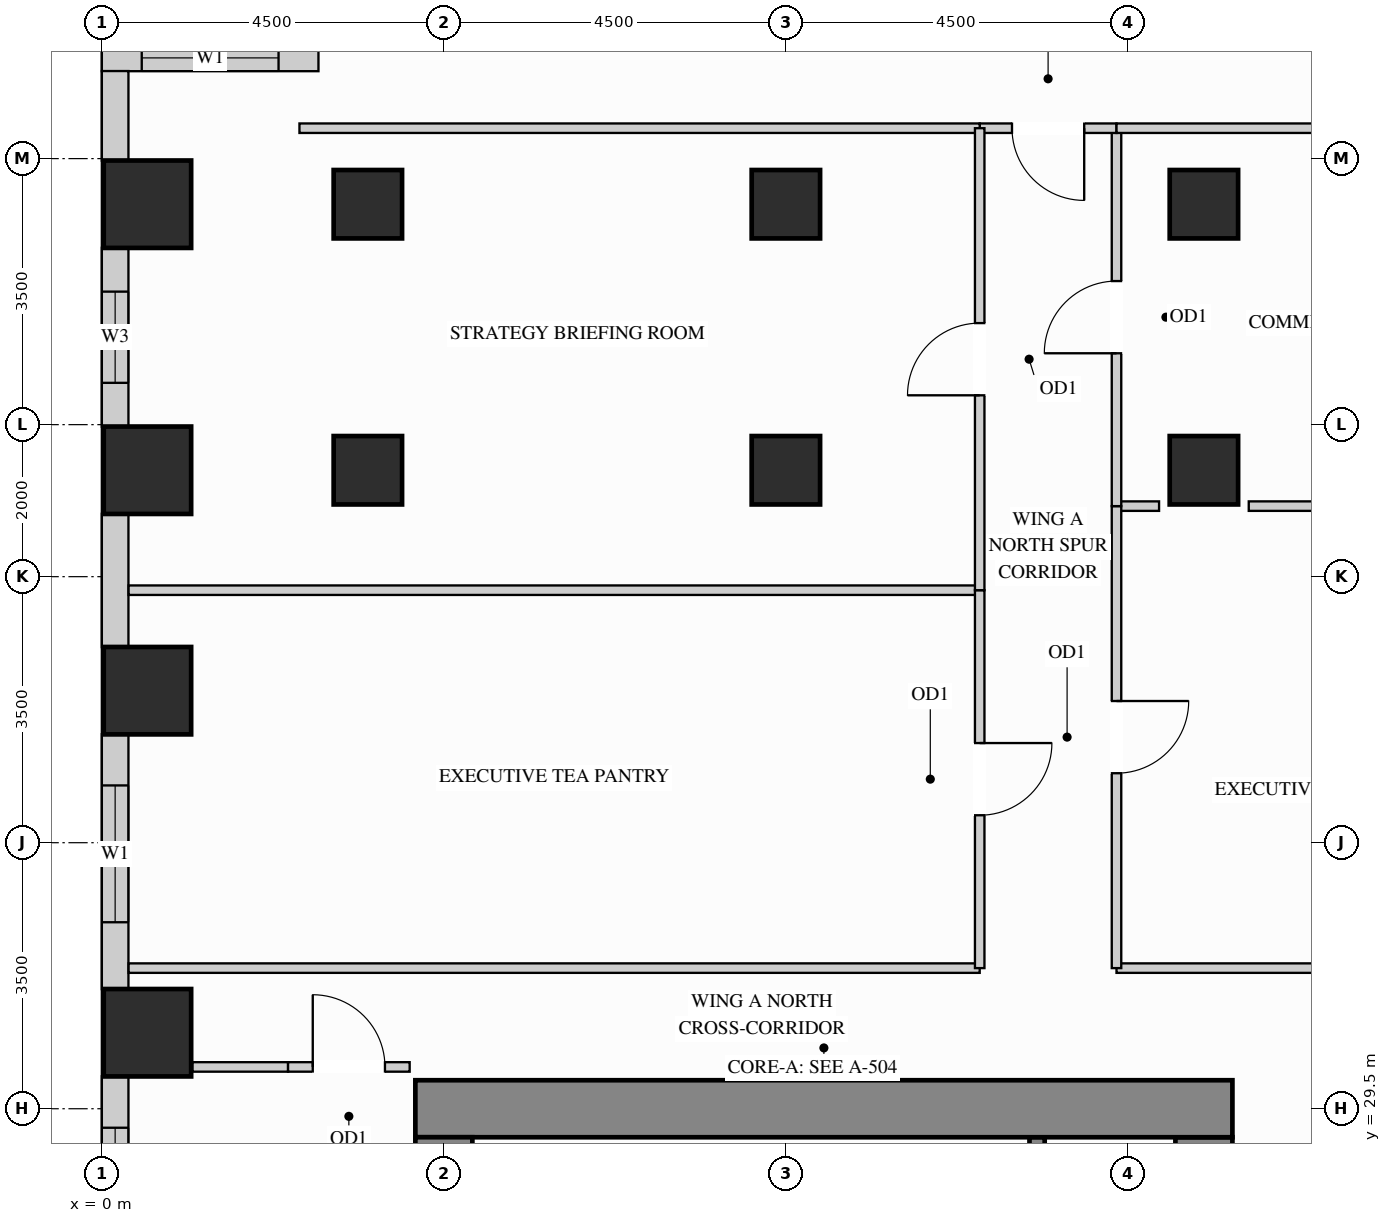
"""IFC4 building model, lengths in metres.
Left out: names, types, materials, properties, quantities, classifications, styles, units other than length and angle.
Written with IfcOpenShell. Run it as: python <this file> out.ifc"""

import sys

from ifc_helpers import new_model, si_unit, direction, frame, frame_2d, origin, origin_2d, place, context, subcontext, project, spatial, rectangle, extrude, source, transform, mapped, element, fill, save


model = new_model("IFC4")
c1 = context("Model", 3, precision=1e-05, world=origin(), true_north=direction((0.0, 1.0)))
c2 = subcontext(c1, "Body", "Model", "MODEL_VIEW")
j1 = project(units=[si_unit("LENGTHUNIT", "METRE"), si_unit("PLANEANGLEUNIT", "RADIAN")], contexts=[c1])
p1 = place(None, origin())
s1 = spatial("IfcSite", under=j1, at=p1, CompositionType="ELEMENT")
p2 = place(p1, origin())
s2 = spatial("IfcBuilding", under=s1, at=p2, CompositionType="ELEMENT")
p3 = place(p2, frame((0.0, 0.0, 88.2)))
s3 = spatial("IfcBuildingStorey", under=s2, at=p3, CompositionType="ELEMENT", Elevation=88.2)
m1 = source(origin(), c2, "Body", "SweptSolid", [
    extrude(rectangle(XDim=0.9, YDim=0.9, at=origin_2d()), origin(), (0.0, 0.0, 1.0), 3.38),
])
for number, where, z_axis, x_axis in (
    (1, (14.5, 37.9, 0.0), (0.0, 0.0, 1.0), (1.0, 0.0, 0.0)),
    (2, (14.5, 41.4, 0.0), (0.0, 0.0, 1.0), (1.0, 0.0, 0.0)),
    (3, (3.5, 37.9, 0.0), (0.0, 0.0, 1.0), (1.0, 0.0, 0.0)),
    (4, (3.5, 41.4, 0.0), (0.0, 0.0, 1.0), (1.0, 0.0, 0.0)),
    (5, (9.0, 37.9, 0.0), (0.0, 0.0, 1.0), (1.0, 0.0, 0.0)),
    (6, (9.0, 41.4, 0.0), (0.0, 0.0, 1.0), (1.0, 0.0, 0.0)),
):
    element("IfcColumn", number, at=place(p3, frame(where, z_axis=z_axis, x_axis=x_axis)), inside=s3, PredefinedType="COLUMN", context=c2, shape_type="MappedRepresentation", body=[
        mapped(m1, transform((0.0, 0.0, 0.0), x_axis=(1.0, 0.0, 0.0), y_axis=(0.0, 1.0, 0.0), z_axis=(0.0, 0.0, 1.0))),
    ])
m2 = source(origin(), c2, "Body", "SweptSolid", [
    extrude(rectangle(XDim=1.15, YDim=1.15, at=origin_2d()), origin(), (0.0, 0.0, 1.0), 3.38),
])
for number, where, z_axis, x_axis in (
    (7, (0.6, 30.5, 0.0), (0.0, 0.0, 1.0), (1.0, 0.0, 0.0)),
    (8, (0.6, 35.0, 0.0), (0.0, 0.0, 1.0), (1.0, 0.0, 0.0)),
    (9, (0.6, 37.9, 0.0), (0.0, 0.0, 1.0), (1.0, 0.0, 0.0)),
    (10, (0.6, 41.4, 0.0), (0.0, 0.0, 1.0), (1.0, 0.0, 0.0)),
):
    element("IfcColumn", number, at=place(p3, frame(where, z_axis=z_axis, x_axis=x_axis)), inside=s3, PredefinedType="COLUMN", context=c2, shape_type="MappedRepresentation", body=[
        mapped(m2, transform((0.0, 0.0, 0.0), x_axis=(1.0, 0.0, 0.0), y_axis=(0.0, 1.0, 0.0), z_axis=(0.0, 0.0, 1.0))),
    ])
m3 = source(origin(), c2, "Body", "SweptSolid", [
    extrude(rectangle(XDim=8.245, YDim=0.75, at=frame_2d((4.123, 0.0))), origin(), (0.0, 0.0, 1.0), 3.38),
])
p4 = place(p3, frame((14.5, 20.88, 0.0), z_axis=(0.0, 0.0, 1.0), x_axis=(0.0, 1.0, 0.0)))
e11 = element("IfcWall", 11, at=p4, inside=s3, PredefinedType="SHEAR", context=c2, shape_type="MappedRepresentation", body=[
    mapped(m3, transform((0.0, 0.0, 0.0), x_axis=(1.0, 0.0, 0.0), y_axis=(0.0, 1.0, 0.0), z_axis=(0.0, 0.0, 1.0))),
])
m4 = source(origin(), c2, "Body", "SweptSolid", [
    extrude(rectangle(XDim=10.75, YDim=0.75, at=frame_2d((5.375, 0.0))), origin(), (0.0, 0.0, 1.0), 3.38),
])
p5 = place(p3, frame((4.125, 29.5, 0.0), z_axis=(0.0, 0.0, 1.0), x_axis=(1.0, 0.0, 0.0)))
e12 = element("IfcWall", 12, at=p5, inside=s3, PredefinedType="SHEAR", context=c2, shape_type="MappedRepresentation", body=[
    mapped(m4, transform((0.0, 0.0, 0.0), x_axis=(1.0, 0.0, 0.0), y_axis=(0.0, 1.0, 0.0), z_axis=(0.0, 0.0, 1.0))),
])
m5 = source(origin(), c2, "Body", "SweptSolid", [
    extrude(rectangle(XDim=20.25, YDim=0.75, at=frame_2d((10.125, 0.0))), origin(), (0.0, 0.0, 1.0), 3.38),
])
p6 = place(p3, frame((4.5, 8.875, 0.0), z_axis=(0.0, 0.0, 1.0), x_axis=(0.0, 1.0, 0.0)))
e13 = element("IfcWall", 13, at=p6, inside=s3, PredefinedType="SHEAR", context=c2, shape_type="MappedRepresentation", body=[
    mapped(m5, transform((0.0, 0.0, 0.0), x_axis=(1.0, 0.0, 0.0), y_axis=(0.0, 1.0, 0.0), z_axis=(0.0, 0.0, 1.0))),
])
p7 = place(p3, frame((2.85, 43.325, 0.0), z_axis=(0.0, 0.0, 1.0), x_axis=(-1.0, 0.0, 0.0)))
e14 = element("IfcWall", 14, at=p7, inside=s3, PredefinedType="SOLIDWALL", context=c2, shape_type="SweptSolid", body=[
    extrude(rectangle(XDim=2.85, YDim=0.35, at=frame_2d((1.425, 0.0))), origin(), (0.0, 0.0, 1.0), 3.365),
])
p8 = place(p7, frame((0.525, 0.0, 0.78)))
e15 = element("IfcOpeningElement", 15, at=p8, cuts=e14, PredefinedType="OPENING", context=c2, shape_type="SweptSolid", body=[
    extrude(rectangle(XDim=1.8, YDim=2.1, at=frame_2d((0.9, 1.05))), frame((0.0, 0.185, 0.0), z_axis=(0.0, -1.0, 0.0), x_axis=(1.0, 0.0, 0.0)), (0.0, 0.0, 1.0), 0.37),
])
m6 = source(origin(), c2, "Body", "SweptSolid", [
    extrude(rectangle(XDim=1.179, YDim=0.35, at=frame_2d((0.59, 0.0))), origin(), (0.0, 0.0, 1.0), 3.365),
])
p9 = place(p3, frame((0.175, 43.152, 0.0), z_axis=(0.0, 0.0, 1.0), x_axis=(0.0, -1.0, 0.0)))
e16 = element("IfcWall", 16, at=p9, inside=s3, PredefinedType="SOLIDWALL", context=c2, shape_type="MappedRepresentation", body=[
    mapped(m6, transform((0.0, 0.0, 0.0), x_axis=(1.0, 0.0, 0.0), y_axis=(0.0, 1.0, 0.0), z_axis=(0.0, 0.0, 1.0))),
])
p10 = place(p3, frame((0.175, 40.827, 0.0), z_axis=(0.0, 0.0, 1.0), x_axis=(0.0, -1.0, 0.0)))
e17 = element("IfcWall", 17, at=p10, inside=s3, PredefinedType="SOLIDWALL", context=c2, shape_type="SweptSolid", body=[
    extrude(rectangle(XDim=2.354, YDim=0.35, at=frame_2d((1.177, 0.0))), origin(), (0.0, 0.0, 1.0), 3.365),
])
p11 = place(p10, frame((0.577, 0.0, 0.78)))
e18 = element("IfcOpeningElement", 18, at=p11, cuts=e17, PredefinedType="OPENING", context=c2, shape_type="SweptSolid", body=[
    extrude(rectangle(XDim=1.2, YDim=2.1, at=frame_2d((0.6, 1.05))), frame((0.0, 0.185, 0.0), z_axis=(0.0, -1.0, 0.0), x_axis=(1.0, 0.0, 0.0)), (0.0, 0.0, 1.0), 0.37),
])
m7 = source(origin(), c2, "Body", "SweptSolid", [
    extrude(rectangle(XDim=1.754, YDim=0.35, at=frame_2d((0.877, 0.0))), origin(), (0.0, 0.0, 1.0), 3.365),
])
p12 = place(p3, frame((0.175, 37.327, 0.0), z_axis=(0.0, 0.0, 1.0), x_axis=(0.0, -1.0, 0.0)))
e19 = element("IfcWall", 19, at=p12, inside=s3, PredefinedType="SOLIDWALL", context=c2, shape_type="MappedRepresentation", body=[
    mapped(m7, transform((0.0, 0.0, 0.0), x_axis=(1.0, 0.0, 0.0), y_axis=(0.0, 1.0, 0.0), z_axis=(0.0, 0.0, 1.0))),
])
p13 = place(p3, frame((0.175, 34.427, 0.0), z_axis=(0.0, 0.0, 1.0), x_axis=(0.0, -1.0, 0.0)))
e20 = element("IfcWall", 20, at=p13, inside=s3, PredefinedType="SOLIDWALL", context=c2, shape_type="SweptSolid", body=[
    extrude(rectangle(XDim=3.354, YDim=0.35, at=frame_2d((1.677, 0.0))), origin(), (0.0, 0.0, 1.0), 3.365),
])
p14 = place(p13, frame((0.674, 0.0, 0.78)))
e21 = element("IfcOpeningElement", 21, at=p14, cuts=e20, PredefinedType="OPENING", context=c2, shape_type="SweptSolid", body=[
    extrude(rectangle(XDim=1.8, YDim=2.1, at=frame_2d((0.9, 1.05))), frame((0.0, 0.185, 0.0), z_axis=(0.0, -1.0, 0.0), x_axis=(1.0, 0.0, 0.0)), (0.0, 0.0, 1.0), 0.37),
])
p15 = place(p3, frame((0.175, 29.927, 0.0), z_axis=(0.0, 0.0, 1.0), x_axis=(0.0, -1.0, 0.0)))
e22 = element("IfcWall", 22, at=p15, inside=s3, PredefinedType="SOLIDWALL", context=c2, shape_type="SweptSolid", body=[
    extrude(rectangle(XDim=2.554, YDim=0.35, at=frame_2d((1.277, 0.0))), origin(), (0.0, 0.0, 1.0), 3.365),
])
p16 = place(p15, frame((0.677, 0.0, 0.78)))
e23 = element("IfcOpeningElement", 23, at=p16, cuts=e22, PredefinedType="OPENING", context=c2, shape_type="SweptSolid", body=[
    extrude(rectangle(XDim=1.2, YDim=2.1, at=frame_2d((0.6, 1.05))), frame((0.0, 0.185, 0.0), z_axis=(0.0, -1.0, 0.0), x_axis=(1.0, 0.0, 0.0)), (0.0, 0.0, 1.0), 0.37),
])
m8 = source(origin(), c2, "Body", "SweptSolid", [
    extrude(rectangle(XDim=0.56, YDim=0.125, at=frame_2d((0.28, 0.0))), origin(), (0.0, 0.0, 1.0), 3.365),
])
p17 = place(p3, frame((13.35, 37.428, 0.0), z_axis=(0.0, 0.0, 1.0), x_axis=(1.0, 0.0, 0.0)))
e24 = element("IfcWall", 24, at=p17, inside=s3, PredefinedType="PARTITIONING", context=c2, shape_type="MappedRepresentation", body=[
    mapped(m8, transform((0.0, 0.0, 0.0), x_axis=(1.0, 0.0, 0.0), y_axis=(0.0, 1.0, 0.0), z_axis=(0.0, 0.0, 1.0))),
])
m9 = source(origin(), c2, "Body", "SweptSolid", [
    extrude(rectangle(XDim=3.32, YDim=0.125, at=frame_2d((1.66, 0.0))), origin(), (0.0, 0.0, 1.0), 3.365),
])
p18 = place(p3, frame((15.09, 37.428, 0.0), z_axis=(0.0, 0.0, 1.0), x_axis=(1.0, 0.0, 0.0)))
e25 = element("IfcWall", 25, at=p18, inside=s3, PredefinedType="PARTITIONING", context=c2, shape_type="MappedRepresentation", body=[
    mapped(m9, transform((0.0, 0.0, 0.0), x_axis=(1.0, 0.0, 0.0), y_axis=(0.0, 1.0, 0.0), z_axis=(0.0, 0.0, 1.0))),
])
m10 = source(origin(), c2, "Body", "SweptSolid", [
    extrude(rectangle(XDim=5.798, YDim=0.125, at=frame_2d((2.899, 0.0))), origin(), (0.0, 0.0, 1.0), 3.365),
])
p19 = place(p3, frame((13.35, 31.35, 0.0), z_axis=(0.0, 0.0, 1.0), x_axis=(1.0, 0.0, 0.0)))
e26 = element("IfcWall", 26, at=p19, inside=s3, PredefinedType="PARTITIONING", context=c2, shape_type="MappedRepresentation", body=[
    mapped(m10, transform((0.0, 0.0, 0.0), x_axis=(1.0, 0.0, 0.0), y_axis=(0.0, 1.0, 0.0), z_axis=(0.0, 0.0, 1.0))),
])
m11 = source(origin(), c2, "Body", "SweptSolid", [
    extrude(rectangle(XDim=11.198, YDim=0.125, at=frame_2d((5.599, 0.0))), origin(), (0.0, 0.0, 1.0), 3.365),
])
p20 = place(p3, frame((0.352, 31.35, 0.0), z_axis=(0.0, 0.0, 1.0), x_axis=(1.0, 0.0, 0.0)))
e27 = element("IfcWall", 27, at=p20, inside=s3, PredefinedType="PARTITIONING", context=c2, shape_type="MappedRepresentation", body=[
    mapped(m11, transform((0.0, 0.0, 0.0), x_axis=(1.0, 0.0, 0.0), y_axis=(0.0, 1.0, 0.0), z_axis=(0.0, 0.0, 1.0))),
])
m12 = source(origin(), c2, "Body", "SweptSolid", [
    extrude(rectangle(XDim=11.198, YDim=0.125, at=frame_2d((5.599, 0.0))), origin(), (0.0, 0.0, 1.0), 2.828),
])
p21 = place(p3, frame((0.352, 36.322, 0.0), z_axis=(0.0, 0.0, 1.0), x_axis=(1.0, 0.0, 0.0)))
e28 = element("IfcWall", 28, at=p21, inside=s3, PredefinedType="PARTITIONING", context=c2, shape_type="MappedRepresentation", body=[
    mapped(m12, transform((0.0, 0.0, 0.0), x_axis=(1.0, 0.0, 0.0), y_axis=(0.0, 1.0, 0.0), z_axis=(0.0, 0.0, 1.0))),
])
m13 = source(origin(), c2, "Body", "SweptSolid", [
    extrude(rectangle(XDim=1.26, YDim=0.125, at=frame_2d((0.63, 0.0))), origin(), (0.0, 0.0, 1.0), 3.365),
])
p22 = place(p3, frame((1.19, 30.05, 0.0), z_axis=(0.0, 0.0, 1.0), x_axis=(1.0, 0.0, 0.0)))
e29 = element("IfcWall", 29, at=p22, inside=s3, PredefinedType="PARTITIONING", context=c2, shape_type="MappedRepresentation", body=[
    mapped(m13, transform((0.0, 0.0, 0.0), x_axis=(1.0, 0.0, 0.0), y_axis=(0.0, 1.0, 0.0), z_axis=(0.0, 0.0, 1.0))),
])
p23 = place(p3, frame((2.45, 30.05, 0.0), z_axis=(0.0, 0.0, 1.0), x_axis=(1.0, 0.0, 0.0)))
e30 = element("IfcWall", 30, at=p23, inside=s3, PredefinedType="PARTITIONING", context=c2, shape_type="SweptSolid", body=[
    extrude(rectangle(XDim=1.6, YDim=0.125, at=frame_2d((0.8, 0.0))), origin(), (0.0, 0.0, 1.0), 3.365),
])
p24 = place(p23, frame((0.325, 0.0, 0.0)))
e31 = element("IfcOpeningElement", 31, at=p24, cuts=e30, PredefinedType="OPENING", context=c2, shape_type="SweptSolid", body=[
    extrude(rectangle(XDim=0.95, YDim=2.15, at=frame_2d((0.475, 1.075))), frame((0.0, 0.073, 0.0), z_axis=(0.0, -1.0, 0.0), x_axis=(1.0, 0.0, 0.0)), (0.0, 0.0, 1.0), 0.145),
])
p25 = place(p3, frame((13.35, 31.35, 0.0), z_axis=(0.0, 0.0, 1.0), x_axis=(0.0, 1.0, 0.0)))
e32 = element("IfcWall", 32, at=p25, inside=s3, PredefinedType="PARTITIONING", context=c2, shape_type="SweptSolid", body=[
    extrude(rectangle(XDim=6.078, YDim=0.125, at=frame_2d((3.039, 0.0))), origin(), (0.0, 0.0, 1.0), 3.365),
])
p26 = place(p25, frame((2.564, 0.0, 0.0)))
e33 = element("IfcOpeningElement", 33, at=p26, cuts=e32, PredefinedType="OPENING", context=c2, shape_type="SweptSolid", body=[
    extrude(rectangle(XDim=0.95, YDim=2.15, at=frame_2d((0.475, 1.075))), frame((0.0, 0.073, 0.0), z_axis=(0.0, -1.0, 0.0), x_axis=(1.0, 0.0, 0.0)), (0.0, 0.0, 1.0), 0.145),
])
p27 = place(p3, frame((13.35, 37.428, 0.0), z_axis=(0.0, 0.0, 1.0), x_axis=(0.0, 1.0, 0.0)))
e34 = element("IfcWall", 34, at=p27, inside=s3, PredefinedType="PARTITIONING", context=c2, shape_type="SweptSolid", body=[
    extrude(rectangle(XDim=4.972, YDim=0.125, at=frame_2d((2.486, 0.0))), origin(), (0.0, 0.0, 1.0), 3.365),
])
p28 = place(p27, frame((2.011, 0.0, 0.0)))
e35 = element("IfcOpeningElement", 35, at=p28, cuts=e34, PredefinedType="OPENING", context=c2, shape_type="SweptSolid", body=[
    extrude(rectangle(XDim=0.95, YDim=2.15, at=frame_2d((0.475, 1.075))), frame((0.0, 0.073, 0.0), z_axis=(0.0, -1.0, 0.0), x_axis=(1.0, 0.0, 0.0)), (0.0, 0.0, 1.0), 0.145),
])
p29 = place(p3, frame((11.55, 42.4, 0.0), z_axis=(0.0, 0.0, 1.0), x_axis=(1.0, 0.0, 0.0)))
e36 = element("IfcWall", 36, at=p29, inside=s3, PredefinedType="PARTITIONING", context=c2, shape_type="SweptSolid", body=[
    extrude(rectangle(XDim=1.8, YDim=0.125, at=frame_2d((0.9, 0.0))), origin(), (0.0, 0.0, 1.0), 3.365),
])
p30 = place(p29, frame((0.425, 0.0, 0.0)))
e37 = element("IfcOpeningElement", 37, at=p30, cuts=e36, PredefinedType="OPENING", context=c2, shape_type="SweptSolid", body=[
    extrude(rectangle(XDim=0.95, YDim=2.15, at=frame_2d((0.475, 1.075))), frame((0.0, 0.073, 0.0), z_axis=(0.0, -1.0, 0.0), x_axis=(1.0, 0.0, 0.0)), (0.0, 0.0, 1.0), 0.145),
])
m14 = source(origin(), c2, "Body", "SweptSolid", [
    extrude(rectangle(XDim=3.55, YDim=0.125, at=frame_2d((1.775, 0.0))), origin(), (0.0, 0.0, 1.0), 3.365),
])
p31 = place(p3, frame((13.35, 42.4, 0.0), z_axis=(0.0, 0.0, 1.0), x_axis=(1.0, 0.0, 0.0)))
e38 = element("IfcWall", 38, at=p31, inside=s3, PredefinedType="PARTITIONING", context=c2, shape_type="MappedRepresentation", body=[
    mapped(m14, transform((0.0, 0.0, 0.0), x_axis=(1.0, 0.0, 0.0), y_axis=(0.0, 1.0, 0.0), z_axis=(0.0, 0.0, 1.0))),
])
m15 = source(origin(), c2, "Body", "SweptSolid", [
    extrude(rectangle(XDim=8.95, YDim=0.125, at=frame_2d((4.475, 0.0))), origin(), (0.0, 0.0, 1.0), 3.365),
])
p32 = place(p3, frame((2.6, 42.4, 0.0), z_axis=(0.0, 0.0, 1.0), x_axis=(1.0, 0.0, 0.0)))
e39 = element("IfcWall", 39, at=p32, inside=s3, PredefinedType="PARTITIONING", context=c2, shape_type="MappedRepresentation", body=[
    mapped(m15, transform((0.0, 0.0, 0.0), x_axis=(1.0, 0.0, 0.0), y_axis=(0.0, 1.0, 0.0), z_axis=(0.0, 0.0, 1.0))),
])
p33 = place(p3, frame((11.55, 31.35, 0.0), z_axis=(0.0, 0.0, 1.0), x_axis=(0.0, 1.0, 0.0)))
e40 = element("IfcWall", 40, at=p33, inside=s3, PredefinedType="PARTITIONING", context=c2, shape_type="SweptSolid", body=[
    extrude(rectangle(XDim=4.972, YDim=0.125, at=frame_2d((2.486, 0.0))), origin(), (0.0, 0.0, 1.0), 3.365),
])
p34 = place(p33, frame((2.011, 0.0, 0.0)))
e41 = element("IfcOpeningElement", 41, at=p34, cuts=e40, PredefinedType="OPENING", context=c2, shape_type="SweptSolid", body=[
    extrude(rectangle(XDim=0.95, YDim=2.15, at=frame_2d((0.475, 1.075))), frame((0.0, 0.073, 0.0), z_axis=(0.0, -1.0, 0.0), x_axis=(1.0, 0.0, 0.0)), (0.0, 0.0, 1.0), 0.145),
])
p35 = place(p3, frame((11.55, 36.322, 0.0), z_axis=(0.0, 0.0, 1.0), x_axis=(0.0, 1.0, 0.0)))
e42 = element("IfcWall", 42, at=p35, inside=s3, PredefinedType="PARTITIONING", context=c2, shape_type="SweptSolid", body=[
    extrude(rectangle(XDim=6.078, YDim=0.125, at=frame_2d((3.039, 0.0))), origin(), (0.0, 0.0, 1.0), 3.365),
])
p36 = place(p35, frame((2.564, 0.0, 0.0)))
e43 = element("IfcOpeningElement", 43, at=p36, cuts=e42, PredefinedType="OPENING", context=c2, shape_type="SweptSolid", body=[
    extrude(rectangle(XDim=0.95, YDim=2.15, at=frame_2d((0.475, 1.075))), frame((0.0, 0.073, 0.0), z_axis=(0.0, -1.0, 0.0), x_axis=(1.0, 0.0, 0.0)), (0.0, 0.0, 1.0), 0.145),
])
m16 = source(origin(), c2, "Body", "SweptSolid", [
    extrude(rectangle(XDim=3.678, YDim=0.2, at=frame_2d((1.839, 0.0))), origin(), (0.0, 0.0, 1.0), 3.38),
])
p37 = place(p3, frame((12.305, 25.445, 0.0), z_axis=(0.0, 0.0, 1.0), x_axis=(0.0, 1.0, 0.0)))
e44 = element("IfcWall", 44, at=p37, inside=s3, PredefinedType="SHEAR", context=c2, shape_type="MappedRepresentation", body=[
    mapped(m16, transform((0.0, 0.0, 0.0), x_axis=(1.0, 0.0, 0.0), y_axis=(0.0, 1.0, 0.0), z_axis=(0.0, 0.0, 1.0))),
])
m17 = source(origin(), c2, "Body", "SweptSolid", [
    extrude(rectangle(XDim=0.95, YDim=2.15, at=frame_2d((0.475, 1.075))), frame((0.0, 0.025, 0.0), z_axis=(0.0, -1.0, 0.0), x_axis=(1.0, 0.0, 0.0)), (0.0, 0.0, 1.0), 0.05),
])
p38 = place(p26, origin())
e45 = element("IfcDoor", 45, at=p38, inside=s3, OperationType="SINGLE_SWING_RIGHT", PredefinedType="DOOR", context=c2, shape_type="MappedRepresentation", body=[
    mapped(m17, transform((0.0, 0.0, 0.0), x_axis=(1.0, 0.0, 0.0), y_axis=(0.0, 1.0, 0.0), z_axis=(0.0, 0.0, 1.0))),
])
fill(e33, e45)
p39 = place(p28, origin())
e46 = element("IfcDoor", 46, at=p39, inside=s3, OperationType="SINGLE_SWING_LEFT", PredefinedType="DOOR", context=c2, shape_type="MappedRepresentation", body=[
    mapped(m17, transform((0.0, 0.0, 0.0), x_axis=(1.0, 0.0, 0.0), y_axis=(0.0, 1.0, 0.0), z_axis=(0.0, 0.0, 1.0))),
])
fill(e35, e46)
p40 = place(p30, origin())
e47 = element("IfcDoor", 47, at=p40, inside=s3, OperationType="SINGLE_SWING_RIGHT", PredefinedType="DOOR", context=c2, shape_type="MappedRepresentation", body=[
    mapped(m17, transform((0.0, 0.0, 0.0), x_axis=(1.0, 0.0, 0.0), y_axis=(0.0, 1.0, 0.0), z_axis=(0.0, 0.0, 1.0))),
])
fill(e37, e47)
p41 = place(p34, origin())
e48 = element("IfcDoor", 48, at=p41, inside=s3, OperationType="SINGLE_SWING_RIGHT", PredefinedType="DOOR", context=c2, shape_type="MappedRepresentation", body=[
    mapped(m17, transform((0.0, 0.0, 0.0), x_axis=(1.0, 0.0, 0.0), y_axis=(0.0, 1.0, 0.0), z_axis=(0.0, 0.0, 1.0))),
])
fill(e41, e48)
p42 = place(p36, origin())
e49 = element("IfcDoor", 49, at=p42, inside=s3, OperationType="SINGLE_SWING_LEFT", PredefinedType="DOOR", context=c2, shape_type="MappedRepresentation", body=[
    mapped(m17, transform((0.0, 0.0, 0.0), x_axis=(1.0, 0.0, 0.0), y_axis=(0.0, 1.0, 0.0), z_axis=(0.0, 0.0, 1.0))),
])
fill(e43, e49)
p43 = place(p24, origin())
e50 = element("IfcDoor", 50, at=p43, inside=s3, OperationType="SINGLE_SWING_LEFT", PredefinedType="DOOR", context=c2, shape_type="MappedRepresentation", body=[
    mapped(m17, transform((0.0, 0.0, 0.0), x_axis=(1.0, 0.0, 0.0), y_axis=(0.0, 1.0, 0.0), z_axis=(0.0, 0.0, 1.0))),
])
fill(e31, e50)
m18 = source(origin(), c2, "Body", "SweptSolid", [
    extrude(rectangle(XDim=1.8, YDim=2.1, at=frame_2d((0.9, 1.05))), frame((0.0, 0.03, 0.0), z_axis=(0.0, -1.0, 0.0), x_axis=(1.0, 0.0, 0.0)), (0.0, 0.0, 1.0), 0.06),
])
p44 = place(p8, origin())
e51 = element("IfcWindow", 51, at=p44, inside=s3, PartitioningType="SINGLE_PANEL", PredefinedType="WINDOW", context=c2, shape_type="MappedRepresentation", body=[
    mapped(m18, transform((0.0, 0.0, 0.0), x_axis=(1.0, 0.0, 0.0), y_axis=(0.0, 1.0, 0.0), z_axis=(0.0, 0.0, 1.0))),
])
fill(e15, e51)
p45 = place(p14, origin())
e52 = element("IfcWindow", 52, at=p45, inside=s3, PartitioningType="SINGLE_PANEL", PredefinedType="WINDOW", context=c2, shape_type="MappedRepresentation", body=[
    mapped(m18, transform((0.0, 0.0, 0.0), x_axis=(1.0, 0.0, 0.0), y_axis=(0.0, 1.0, 0.0), z_axis=(0.0, 0.0, 1.0))),
])
fill(e21, e52)
m19 = source(origin(), c2, "Body", "SweptSolid", [
    extrude(rectangle(XDim=1.2, YDim=2.1, at=frame_2d((0.6, 1.05))), frame((0.0, 0.03, 0.0), z_axis=(0.0, -1.0, 0.0), x_axis=(1.0, 0.0, 0.0)), (0.0, 0.0, 1.0), 0.06),
])
p46 = place(p11, origin())
e53 = element("IfcWindow", 53, at=p46, inside=s3, PartitioningType="SINGLE_PANEL", PredefinedType="WINDOW", context=c2, shape_type="MappedRepresentation", body=[
    mapped(m19, transform((0.0, 0.0, 0.0), x_axis=(1.0, 0.0, 0.0), y_axis=(0.0, 1.0, 0.0), z_axis=(0.0, 0.0, 1.0))),
])
fill(e18, e53)
p47 = place(p16, origin())
e54 = element("IfcWindow", 54, at=p47, inside=s3, PartitioningType="SINGLE_PANEL", PredefinedType="WINDOW", context=c2, shape_type="MappedRepresentation", body=[
    mapped(m19, transform((0.0, 0.0, 0.0), x_axis=(1.0, 0.0, 0.0), y_axis=(0.0, 1.0, 0.0), z_axis=(0.0, 0.0, 1.0))),
])
fill(e23, e54)
save(model, sys.argv[1])
